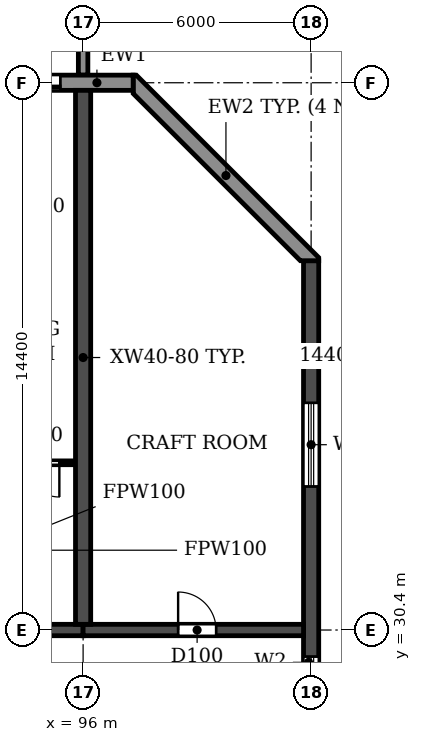
"""IFC4 building model, lengths in metres.
Left out: names, types, materials, properties, quantities, classifications, styles, units other than length and angle.
Written with IfcOpenShell. Run it as: python <this file> out.ifc"""

import sys

from ifc_helpers import new_model, si_unit, direction, frame, frame_2d, origin, place, context, subcontext, project, spatial, polyline, rectangle, outline, extrude, source, transform, mapped, element, fill, save


model = new_model("IFC4")
c1 = context("Model", 3, precision=1e-05, world=origin(), true_north=direction((0.0, 1.0)))
c2 = subcontext(c1, "Body", "Model", "MODEL_VIEW")
j1 = project(units=[si_unit("LENGTHUNIT", "METRE"), si_unit("PLANEANGLEUNIT", "RADIAN")], contexts=[c1])
p1 = place(None, origin())
s1 = spatial("IfcSite", under=j1, at=p1, CompositionType="ELEMENT")
p2 = place(p1, origin())
s2 = spatial("IfcBuilding", under=s1, at=p2, CompositionType="ELEMENT")
p3 = place(p2, frame((0.0, 0.0, 33.3)))
s3 = spatial("IfcBuildingStorey", under=s2, at=p3, CompositionType="ELEMENT", Elevation=33.3)
p4 = place(p3, frame((96.0, 30.55, 0.0), z_axis=(0.0, 0.0, 1.0), x_axis=(0.0, 1.0, 0.0)))
e1 = element("IfcWall", 1, at=p4, inside=s3, PredefinedType="SHEAR", context=c2, shape_type="SweptSolid", body=[
    extrude(rectangle(XDim=14.05, YDim=0.4, at=frame_2d((7.025, 0.0))), origin(), (0.0, 0.0, 1.0), 3.05),
])
p5 = place(p3, frame((102.0, 4.683, 0.0), z_axis=(0.0, 0.0, 1.0), x_axis=(0.0, 1.0, 0.0)))
e2 = element("IfcWall", 2, at=p5, inside=s3, PredefinedType="SHEAR", context=c2, shape_type="SweptSolid", body=[
    extrude(rectangle(XDim=35.434, YDim=0.4, at=frame_2d((17.717, 0.0))), origin(), (0.0, 0.0, 1.0), 3.05),
])
p6 = place(p5, frame((15.917, 0.0, 0.9)))
e3 = element("IfcOpeningElement", 3, at=p6, cuts=e2, PredefinedType="OPENING", context=c2, shape_type="SweptSolid", body=[
    extrude(rectangle(XDim=1.2, YDim=1.5, at=frame_2d((0.6, 0.75))), frame((0.0, 0.21, 0.0), z_axis=(0.0, -1.0, 0.0), x_axis=(1.0, 0.0, 0.0)), (0.0, 0.0, 1.0), 0.42),
])
p7 = place(p5, frame((23.817, 0.0, 0.9)))
e4 = element("IfcOpeningElement", 4, at=p7, cuts=e2, PredefinedType="OPENING", context=c2, shape_type="SweptSolid", body=[
    extrude(rectangle(XDim=1.2, YDim=1.5, at=frame_2d((0.6, 0.75))), frame((0.0, 0.21, 0.0), z_axis=(0.0, -1.0, 0.0), x_axis=(1.0, 0.0, 0.0)), (0.0, 0.0, 1.0), 0.42),
])
p8 = place(p5, frame((8.017, 0.0, 0.9)))
e5 = element("IfcOpeningElement", 5, at=p8, cuts=e2, PredefinedType="OPENING", context=c2, shape_type="SweptSolid", body=[
    extrude(rectangle(XDim=1.2, YDim=1.5, at=frame_2d((0.6, 0.75))), frame((0.0, 0.21, 0.0), z_axis=(0.0, -1.0, 0.0), x_axis=(1.0, 0.0, 0.0)), (0.0, 0.0, 1.0), 0.42),
])
p9 = place(p5, frame((29.493, 0.0, 0.6)))
e6 = element("IfcOpeningElement", 6, at=p9, cuts=e2, PredefinedType="OPENING", context=c2, shape_type="SweptSolid", body=[
    extrude(rectangle(XDim=2.2, YDim=1.8, at=frame_2d((1.1, 0.9))), frame((0.0, 0.21, 0.0), z_axis=(0.0, -1.0, 0.0), x_axis=(1.0, 0.0, 0.0)), (0.0, 0.0, 1.0), 0.42),
])
p10 = place(p5, frame((2.541, 0.0, 0.6)))
e7 = element("IfcOpeningElement", 7, at=p10, cuts=e2, PredefinedType="OPENING", context=c2, shape_type="SweptSolid", body=[
    extrude(rectangle(XDim=2.2, YDim=1.8, at=frame_2d((1.1, 0.9))), frame((0.0, 0.21, 0.0), z_axis=(0.0, -1.0, 0.0), x_axis=(1.0, 0.0, 0.0)), (0.0, 0.0, 1.0), 0.42),
])
p11 = place(p3, frame((90.0, 30.4, 0.0), z_axis=(0.0, 0.0, 1.0), x_axis=(1.0, 0.0, 0.0)))
e8 = element("IfcWall", 8, at=p11, inside=s3, PredefinedType="SHEAR", context=c2, shape_type="SweptSolid", body=[
    extrude(rectangle(XDim=6.0, YDim=0.3, at=frame_2d((3.0, 0.0))), origin(), (0.0, 0.0, 1.0), 2.45),
])
p12 = place(p11, frame((2.45, 0.0, 0.0)))
e9 = element("IfcOpeningElement", 9, at=p12, cuts=e8, PredefinedType="OPENING", context=c2, shape_type="SweptSolid", body=[
    extrude(rectangle(XDim=1.0, YDim=2.1, at=frame_2d((0.5, 1.05))), frame((0.0, 0.16, 0.0), z_axis=(0.0, -1.0, 0.0), x_axis=(1.0, 0.0, 0.0)), (0.0, 0.0, 1.0), 0.32),
])
p13 = place(p3, frame((96.0, 30.4, 0.0), z_axis=(0.0, 0.0, 1.0), x_axis=(1.0, 0.0, 0.0)))
e10 = element("IfcWall", 10, at=p13, inside=s3, PredefinedType="SHEAR", context=c2, shape_type="SweptSolid", body=[
    extrude(rectangle(XDim=5.8, YDim=0.3, at=frame_2d((2.9, 0.0))), origin(), (0.0, 0.0, 1.0), 2.45),
])
p14 = place(p13, frame((2.5, 0.0, 0.0)))
e11 = element("IfcOpeningElement", 11, at=p14, cuts=e10, PredefinedType="OPENING", context=c2, shape_type="SweptSolid", body=[
    extrude(rectangle(XDim=1.0, YDim=2.1, at=frame_2d((0.5, 1.05))), frame((0.0, 0.16, 0.0), z_axis=(0.0, -1.0, 0.0), x_axis=(1.0, 0.0, 0.0)), (0.0, 0.0, 1.0), 0.32),
])
p15 = place(p3, origin())
e12 = element("IfcWall", 12, at=p15, inside=s3, PredefinedType="STANDARD", context=c2, shape_type="SweptSolid", body=[
    extrude(outline(polyline([(102.2, 40.117), (102.2, 40.2), (97.4, 45.0), (97.317, 45.0), (97.317, 44.517), (101.717, 40.117), (102.2, 40.117)])), origin(), (0.0, 0.0, 1.0), 3.05),
])
p16 = place(p3, frame((97.317, 44.8, 0.0), z_axis=(0.0, 0.0, 1.0), x_axis=(-1.0, 0.0, 0.0)))
e13 = element("IfcWall", 13, at=p16, inside=s3, PredefinedType="STANDARD", context=c2, shape_type="SweptSolid", body=[
    extrude(rectangle(XDim=92.634, YDim=0.4, at=frame_2d((46.317, 0.0))), origin(), (0.0, 0.0, 1.0), 3.05),
])
p17 = place(p16, frame((88.717, 0.0, 0.9)))
e14 = element("IfcOpeningElement", 14, at=p17, cuts=e13, PredefinedType="OPENING", context=c2, shape_type="SweptSolid", body=[
    extrude(rectangle(XDim=2.2, YDim=1.5, at=frame_2d((1.1, 0.75))), frame((0.0, 0.21, 0.0), z_axis=(0.0, -1.0, 0.0), x_axis=(1.0, 0.0, 0.0)), (0.0, 0.0, 1.0), 0.42),
])
p18 = place(p16, frame((85.917, 0.0, 0.0)))
e15 = element("IfcOpeningElement", 15, at=p18, cuts=e13, PredefinedType="OPENING", context=c2, shape_type="SweptSolid", body=[
    extrude(rectangle(XDim=1.8, YDim=2.4, at=frame_2d((0.9, 1.2))), frame((0.0, 0.21, 0.0), z_axis=(0.0, -1.0, 0.0), x_axis=(1.0, 0.0, 0.0)), (0.0, 0.0, 1.0), 0.42),
])
p19 = place(p16, frame((82.717, 0.0, 0.9)))
e16 = element("IfcOpeningElement", 16, at=p19, cuts=e13, PredefinedType="OPENING", context=c2, shape_type="SweptSolid", body=[
    extrude(rectangle(XDim=2.2, YDim=1.5, at=frame_2d((1.1, 0.75))), frame((0.0, 0.21, 0.0), z_axis=(0.0, -1.0, 0.0), x_axis=(1.0, 0.0, 0.0)), (0.0, 0.0, 1.0), 0.42),
])
p20 = place(p16, frame((79.917, 0.0, 0.0)))
e17 = element("IfcOpeningElement", 17, at=p20, cuts=e13, PredefinedType="OPENING", context=c2, shape_type="SweptSolid", body=[
    extrude(rectangle(XDim=1.8, YDim=2.4, at=frame_2d((0.9, 1.2))), frame((0.0, 0.21, 0.0), z_axis=(0.0, -1.0, 0.0), x_axis=(1.0, 0.0, 0.0)), (0.0, 0.0, 1.0), 0.42),
])
p21 = place(p16, frame((76.717, 0.0, 0.9)))
e18 = element("IfcOpeningElement", 18, at=p21, cuts=e13, PredefinedType="OPENING", context=c2, shape_type="SweptSolid", body=[
    extrude(rectangle(XDim=2.2, YDim=1.5, at=frame_2d((1.1, 0.75))), frame((0.0, 0.21, 0.0), z_axis=(0.0, -1.0, 0.0), x_axis=(1.0, 0.0, 0.0)), (0.0, 0.0, 1.0), 0.42),
])
p22 = place(p16, frame((73.717, 0.0, 0.9)))
e19 = element("IfcOpeningElement", 19, at=p22, cuts=e13, PredefinedType="OPENING", context=c2, shape_type="SweptSolid", body=[
    extrude(rectangle(XDim=2.2, YDim=1.5, at=frame_2d((1.1, 0.75))), frame((0.0, 0.21, 0.0), z_axis=(0.0, -1.0, 0.0), x_axis=(1.0, 0.0, 0.0)), (0.0, 0.0, 1.0), 0.42),
])
p23 = place(p16, frame((70.717, 0.0, 0.9)))
e20 = element("IfcOpeningElement", 20, at=p23, cuts=e13, PredefinedType="OPENING", context=c2, shape_type="SweptSolid", body=[
    extrude(rectangle(XDim=2.2, YDim=1.5, at=frame_2d((1.1, 0.75))), frame((0.0, 0.21, 0.0), z_axis=(0.0, -1.0, 0.0), x_axis=(1.0, 0.0, 0.0)), (0.0, 0.0, 1.0), 0.42),
])
p24 = place(p16, frame((67.917, 0.0, 0.0)))
e21 = element("IfcOpeningElement", 21, at=p24, cuts=e13, PredefinedType="OPENING", context=c2, shape_type="SweptSolid", body=[
    extrude(rectangle(XDim=1.8, YDim=2.4, at=frame_2d((0.9, 1.2))), frame((0.0, 0.21, 0.0), z_axis=(0.0, -1.0, 0.0), x_axis=(1.0, 0.0, 0.0)), (0.0, 0.0, 1.0), 0.42),
])
p25 = place(p16, frame((64.717, 0.0, 0.9)))
e22 = element("IfcOpeningElement", 22, at=p25, cuts=e13, PredefinedType="OPENING", context=c2, shape_type="SweptSolid", body=[
    extrude(rectangle(XDim=2.2, YDim=1.5, at=frame_2d((1.1, 0.75))), frame((0.0, 0.21, 0.0), z_axis=(0.0, -1.0, 0.0), x_axis=(1.0, 0.0, 0.0)), (0.0, 0.0, 1.0), 0.42),
])
p26 = place(p16, frame((61.717, 0.0, 0.9)))
e23 = element("IfcOpeningElement", 23, at=p26, cuts=e13, PredefinedType="OPENING", context=c2, shape_type="SweptSolid", body=[
    extrude(rectangle(XDim=2.2, YDim=1.5, at=frame_2d((1.1, 0.75))), frame((0.0, 0.21, 0.0), z_axis=(0.0, -1.0, 0.0), x_axis=(1.0, 0.0, 0.0)), (0.0, 0.0, 1.0), 0.42),
])
p27 = place(p16, frame((58.717, 0.0, 0.9)))
e24 = element("IfcOpeningElement", 24, at=p27, cuts=e13, PredefinedType="OPENING", context=c2, shape_type="SweptSolid", body=[
    extrude(rectangle(XDim=2.2, YDim=1.5, at=frame_2d((1.1, 0.75))), frame((0.0, 0.21, 0.0), z_axis=(0.0, -1.0, 0.0), x_axis=(1.0, 0.0, 0.0)), (0.0, 0.0, 1.0), 0.42),
])
p28 = place(p16, frame((55.917, 0.0, 0.0)))
e25 = element("IfcOpeningElement", 25, at=p28, cuts=e13, PredefinedType="OPENING", context=c2, shape_type="SweptSolid", body=[
    extrude(rectangle(XDim=1.8, YDim=2.4, at=frame_2d((0.9, 1.2))), frame((0.0, 0.21, 0.0), z_axis=(0.0, -1.0, 0.0), x_axis=(1.0, 0.0, 0.0)), (0.0, 0.0, 1.0), 0.42),
])
p29 = place(p16, frame((52.717, 0.0, 0.9)))
e26 = element("IfcOpeningElement", 26, at=p29, cuts=e13, PredefinedType="OPENING", context=c2, shape_type="SweptSolid", body=[
    extrude(rectangle(XDim=2.2, YDim=1.5, at=frame_2d((1.1, 0.75))), frame((0.0, 0.21, 0.0), z_axis=(0.0, -1.0, 0.0), x_axis=(1.0, 0.0, 0.0)), (0.0, 0.0, 1.0), 0.42),
])
p30 = place(p16, frame((49.717, 0.0, 0.9)))
e27 = element("IfcOpeningElement", 27, at=p30, cuts=e13, PredefinedType="OPENING", context=c2, shape_type="SweptSolid", body=[
    extrude(rectangle(XDim=2.2, YDim=1.5, at=frame_2d((1.1, 0.75))), frame((0.0, 0.21, 0.0), z_axis=(0.0, -1.0, 0.0), x_axis=(1.0, 0.0, 0.0)), (0.0, 0.0, 1.0), 0.42),
])
p31 = place(p16, frame((46.717, 0.0, 0.9)))
e28 = element("IfcOpeningElement", 28, at=p31, cuts=e13, PredefinedType="OPENING", context=c2, shape_type="SweptSolid", body=[
    extrude(rectangle(XDim=2.2, YDim=1.5, at=frame_2d((1.1, 0.75))), frame((0.0, 0.21, 0.0), z_axis=(0.0, -1.0, 0.0), x_axis=(1.0, 0.0, 0.0)), (0.0, 0.0, 1.0), 0.42),
])
p32 = place(p16, frame((43.917, 0.0, 0.0)))
e29 = element("IfcOpeningElement", 29, at=p32, cuts=e13, PredefinedType="OPENING", context=c2, shape_type="SweptSolid", body=[
    extrude(rectangle(XDim=1.8, YDim=2.4, at=frame_2d((0.9, 1.2))), frame((0.0, 0.21, 0.0), z_axis=(0.0, -1.0, 0.0), x_axis=(1.0, 0.0, 0.0)), (0.0, 0.0, 1.0), 0.42),
])
p33 = place(p16, frame((40.717, 0.0, 0.9)))
e30 = element("IfcOpeningElement", 30, at=p33, cuts=e13, PredefinedType="OPENING", context=c2, shape_type="SweptSolid", body=[
    extrude(rectangle(XDim=2.2, YDim=1.5, at=frame_2d((1.1, 0.75))), frame((0.0, 0.21, 0.0), z_axis=(0.0, -1.0, 0.0), x_axis=(1.0, 0.0, 0.0)), (0.0, 0.0, 1.0), 0.42),
])
p34 = place(p16, frame((37.717, 0.0, 0.9)))
e31 = element("IfcOpeningElement", 31, at=p34, cuts=e13, PredefinedType="OPENING", context=c2, shape_type="SweptSolid", body=[
    extrude(rectangle(XDim=2.2, YDim=1.5, at=frame_2d((1.1, 0.75))), frame((0.0, 0.21, 0.0), z_axis=(0.0, -1.0, 0.0), x_axis=(1.0, 0.0, 0.0)), (0.0, 0.0, 1.0), 0.42),
])
p35 = place(p16, frame((34.717, 0.0, 0.9)))
e32 = element("IfcOpeningElement", 32, at=p35, cuts=e13, PredefinedType="OPENING", context=c2, shape_type="SweptSolid", body=[
    extrude(rectangle(XDim=2.2, YDim=1.5, at=frame_2d((1.1, 0.75))), frame((0.0, 0.21, 0.0), z_axis=(0.0, -1.0, 0.0), x_axis=(1.0, 0.0, 0.0)), (0.0, 0.0, 1.0), 0.42),
])
p36 = place(p16, frame((31.917, 0.0, 0.0)))
e33 = element("IfcOpeningElement", 33, at=p36, cuts=e13, PredefinedType="OPENING", context=c2, shape_type="SweptSolid", body=[
    extrude(rectangle(XDim=1.8, YDim=2.4, at=frame_2d((0.9, 1.2))), frame((0.0, 0.21, 0.0), z_axis=(0.0, -1.0, 0.0), x_axis=(1.0, 0.0, 0.0)), (0.0, 0.0, 1.0), 0.42),
])
p37 = place(p16, frame((28.717, 0.0, 0.9)))
e34 = element("IfcOpeningElement", 34, at=p37, cuts=e13, PredefinedType="OPENING", context=c2, shape_type="SweptSolid", body=[
    extrude(rectangle(XDim=2.2, YDim=1.5, at=frame_2d((1.1, 0.75))), frame((0.0, 0.21, 0.0), z_axis=(0.0, -1.0, 0.0), x_axis=(1.0, 0.0, 0.0)), (0.0, 0.0, 1.0), 0.42),
])
p38 = place(p16, frame((25.717, 0.0, 0.9)))
e35 = element("IfcOpeningElement", 35, at=p38, cuts=e13, PredefinedType="OPENING", context=c2, shape_type="SweptSolid", body=[
    extrude(rectangle(XDim=2.2, YDim=1.5, at=frame_2d((1.1, 0.75))), frame((0.0, 0.21, 0.0), z_axis=(0.0, -1.0, 0.0), x_axis=(1.0, 0.0, 0.0)), (0.0, 0.0, 1.0), 0.42),
])
p39 = place(p16, frame((22.917, 0.0, 0.0)))
e36 = element("IfcOpeningElement", 36, at=p39, cuts=e13, PredefinedType="OPENING", context=c2, shape_type="SweptSolid", body=[
    extrude(rectangle(XDim=1.8, YDim=2.4, at=frame_2d((0.9, 1.2))), frame((0.0, 0.21, 0.0), z_axis=(0.0, -1.0, 0.0), x_axis=(1.0, 0.0, 0.0)), (0.0, 0.0, 1.0), 0.42),
])
p40 = place(p16, frame((19.717, 0.0, 0.9)))
e37 = element("IfcOpeningElement", 37, at=p40, cuts=e13, PredefinedType="OPENING", context=c2, shape_type="SweptSolid", body=[
    extrude(rectangle(XDim=2.2, YDim=1.5, at=frame_2d((1.1, 0.75))), frame((0.0, 0.21, 0.0), z_axis=(0.0, -1.0, 0.0), x_axis=(1.0, 0.0, 0.0)), (0.0, 0.0, 1.0), 0.42),
])
p41 = place(p16, frame((16.717, 0.0, 0.9)))
e38 = element("IfcOpeningElement", 38, at=p41, cuts=e13, PredefinedType="OPENING", context=c2, shape_type="SweptSolid", body=[
    extrude(rectangle(XDim=2.2, YDim=1.5, at=frame_2d((1.1, 0.75))), frame((0.0, 0.21, 0.0), z_axis=(0.0, -1.0, 0.0), x_axis=(1.0, 0.0, 0.0)), (0.0, 0.0, 1.0), 0.42),
])
p42 = place(p16, frame((13.917, 0.0, 0.0)))
e39 = element("IfcOpeningElement", 39, at=p42, cuts=e13, PredefinedType="OPENING", context=c2, shape_type="SweptSolid", body=[
    extrude(rectangle(XDim=1.8, YDim=2.4, at=frame_2d((0.9, 1.2))), frame((0.0, 0.21, 0.0), z_axis=(0.0, -1.0, 0.0), x_axis=(1.0, 0.0, 0.0)), (0.0, 0.0, 1.0), 0.42),
])
p43 = place(p16, frame((10.717, 0.0, 0.9)))
e40 = element("IfcOpeningElement", 40, at=p43, cuts=e13, PredefinedType="OPENING", context=c2, shape_type="SweptSolid", body=[
    extrude(rectangle(XDim=2.2, YDim=1.5, at=frame_2d((1.1, 0.75))), frame((0.0, 0.21, 0.0), z_axis=(0.0, -1.0, 0.0), x_axis=(1.0, 0.0, 0.0)), (0.0, 0.0, 1.0), 0.42),
])
p44 = place(p16, frame((7.917, 0.0, 0.0)))
e41 = element("IfcOpeningElement", 41, at=p44, cuts=e13, PredefinedType="OPENING", context=c2, shape_type="SweptSolid", body=[
    extrude(rectangle(XDim=1.8, YDim=2.4, at=frame_2d((0.9, 1.2))), frame((0.0, 0.21, 0.0), z_axis=(0.0, -1.0, 0.0), x_axis=(1.0, 0.0, 0.0)), (0.0, 0.0, 1.0), 0.42),
])
p45 = place(p16, frame((4.717, 0.0, 0.9)))
e42 = element("IfcOpeningElement", 42, at=p45, cuts=e13, PredefinedType="OPENING", context=c2, shape_type="SweptSolid", body=[
    extrude(rectangle(XDim=2.2, YDim=1.5, at=frame_2d((1.1, 0.75))), frame((0.0, 0.21, 0.0), z_axis=(0.0, -1.0, 0.0), x_axis=(1.0, 0.0, 0.0)), (0.0, 0.0, 1.0), 0.42),
])
p46 = place(p16, frame((1.917, 0.0, 0.0)))
e43 = element("IfcOpeningElement", 43, at=p46, cuts=e13, PredefinedType="OPENING", context=c2, shape_type="SweptSolid", body=[
    extrude(rectangle(XDim=1.8, YDim=2.4, at=frame_2d((0.9, 1.2))), frame((0.0, 0.21, 0.0), z_axis=(0.0, -1.0, 0.0), x_axis=(1.0, 0.0, 0.0)), (0.0, 0.0, 1.0), 0.42),
])
m1 = source(origin(), c2, "Body", "SweptSolid", [
    extrude(outline(polyline([(0.0, 0.0), (0.25, 0.0), (0.25, 3.1), (0.0, 3.1), (0.0, 0.0)])), origin(), (0.0, 0.0, 1.0), 3.1),
])
p47 = place(p3, frame((95.875, 45.0, 0.0)))
e44 = element("IfcWall", 44, at=p47, inside=s3, PredefinedType="STANDARD", context=c2, shape_type="MappedRepresentation", body=[
    mapped(m1, transform((0.0, 0.0, 0.0))),
])
p48 = place(p3, frame((93.8, 34.8, 0.0), z_axis=(0.0, 0.0, 1.0), x_axis=(1.0, 0.0, 0.0)))
e45 = element("IfcWall", 45, at=p48, inside=s3, PredefinedType="PARTITIONING", context=c2, shape_type="SweptSolid", body=[
    extrude(rectangle(XDim=1.99, YDim=0.1, at=frame_2d((0.995, 0.0))), origin(), (0.0, 0.0, 1.0), 3.05),
])
p49 = place(p48, frame((0.675, 0.0, 0.0)))
e46 = element("IfcOpeningElement", 46, at=p49, cuts=e45, PredefinedType="OPENING", context=c2, shape_type="SweptSolid", body=[
    extrude(rectangle(XDim=0.9, YDim=2.1, at=frame_2d((0.45, 1.05))), frame((0.0, 0.06, 0.0), z_axis=(0.0, -1.0, 0.0), x_axis=(1.0, 0.0, 0.0)), (0.0, 0.0, 1.0), 0.12),
])
p50 = place(p7, origin())
e47 = element("IfcWindow", 47, at=p50, inside=s3, PartitioningType="SINGLE_PANEL", PredefinedType="WINDOW", context=c2, shape_type="SweptSolid", body=[
    extrude(rectangle(XDim=1.2, YDim=1.5, at=frame_2d((0.6, 0.75))), frame((0.0, 0.03, 0.0), z_axis=(0.0, -1.0, 0.0), x_axis=(1.0, 0.0, 0.0)), (0.0, 0.0, 1.0), 0.06),
])
fill(e4, e47)
p51 = place(p9, origin())
e48 = element("IfcWindow", 48, at=p51, inside=s3, PartitioningType="DOUBLE_PANEL_HORIZONTAL", PredefinedType="WINDOW", context=c2, shape_type="SweptSolid", body=[
    extrude(rectangle(XDim=2.2, YDim=1.8, at=frame_2d((1.1, 0.9))), frame((0.0, 0.03, 0.0), z_axis=(0.0, -1.0, 0.0), x_axis=(1.0, 0.0, 0.0)), (0.0, 0.0, 1.0), 0.06),
])
fill(e6, e48)
p52 = place(p46, origin())
e49 = element("IfcDoor", 49, at=p52, inside=s3, OperationType="DOUBLE_DOOR_SLIDING", PredefinedType="DOOR", context=c2, shape_type="SweptSolid", body=[
    extrude(rectangle(XDim=1.8, YDim=2.4, at=frame_2d((0.9, 1.2))), frame((0.0, 0.025, 0.0), z_axis=(0.0, -1.0, 0.0), x_axis=(1.0, 0.0, 0.0)), (0.0, 0.0, 1.0), 0.05),
])
fill(e43, e49)
p53 = place(p49, frame((0.9, 0.0, 0.0), z_axis=(0.0, 0.0, 1.0), x_axis=(-1.0, 0.0, 0.0)))
e50 = element("IfcDoor", 50, at=p53, inside=s3, OperationType="SINGLE_SWING_LEFT", PredefinedType="DOOR", context=c2, shape_type="SweptSolid", body=[
    extrude(rectangle(XDim=0.9, YDim=2.1, at=frame_2d((0.45, 1.05))), frame((0.0, 0.025, 0.0), z_axis=(0.0, -1.0, 0.0), x_axis=(1.0, 0.0, 0.0)), (0.0, 0.0, 1.0), 0.05),
])
fill(e46, e50)
p54 = place(p14, origin())
e51 = element("IfcDoor", 51, at=p54, inside=s3, OperationType="SINGLE_SWING_LEFT", PredefinedType="DOOR", context=c2, shape_type="SweptSolid", body=[
    extrude(rectangle(XDim=1.0, YDim=2.1, at=frame_2d((0.5, 1.05))), frame((0.0, 0.025, 0.0), z_axis=(0.0, -1.0, 0.0), x_axis=(1.0, 0.0, 0.0)), (0.0, 0.0, 1.0), 0.05),
])
fill(e11, e51)
save(model, sys.argv[1])
